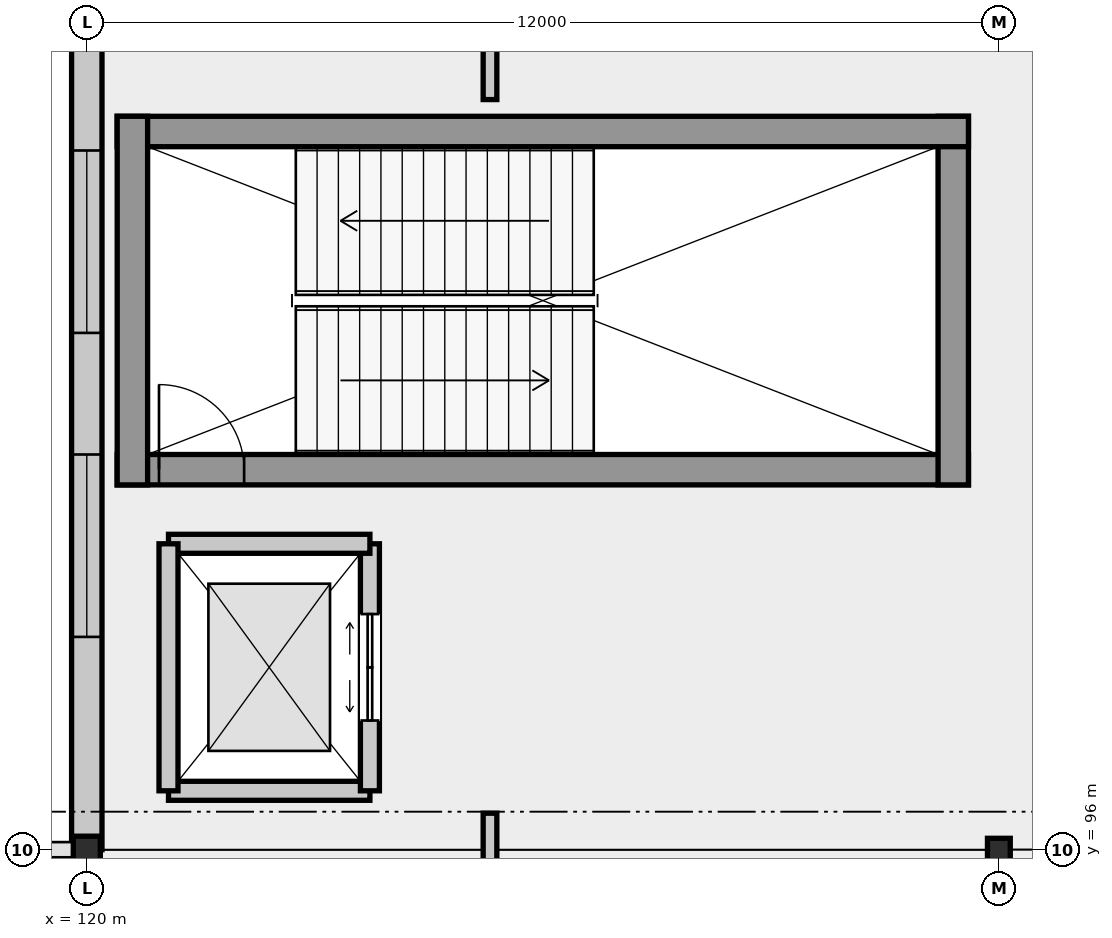
"""IFC4 building model, lengths in metres.
Left out: names, types, materials, properties, quantities, classifications, styles, units other than length and angle.
Written with IfcOpenShell. Run it as: python <this file> out.ifc"""

import sys

from ifc_helpers import new_model, si_unit, direction, frame, frame_2d, origin, origin_2d, place, context, subcontext, project, spatial, rectangle, hollow_circle, i_section, extrude, element, fill, save


model = new_model("IFC4")
c1 = context("Model", 3, precision=1e-05, world=origin(), true_north=direction((0.0, 1.0)))
c2 = subcontext(c1, "Body", "Model", "MODEL_VIEW")
j1 = project(units=[si_unit("LENGTHUNIT", "METRE"), si_unit("PLANEANGLEUNIT", "RADIAN")], contexts=[c1])
p1 = place(None, origin())
s1 = spatial("IfcSite", under=j1, at=p1, CompositionType="ELEMENT")
p2 = place(p1, origin())
s2 = spatial("IfcBuilding", under=s1, at=p2, CompositionType="ELEMENT")
p3 = place(p2, frame((0.0, 0.0, 5.4)))
s3 = spatial("IfcBuildingStorey", under=s2, at=p3, CompositionType="ELEMENT", Elevation=5.4)
p4 = place(p3, frame((120.0, 96.0, 0.0), z_axis=(0.0, 0.0, 1.0), x_axis=(1.0, 0.0, 0.0)))
e1 = element("IfcColumn", 1, at=p4, inside=s3, PredefinedType="COLUMN", context=c2, shape_type="SweptSolid", body=[
    extrude(hollow_circle(Radius=0.178, WallThickness=0.016, at=origin_2d()), origin(), (0.0, 0.0, 1.0), 5.4),
])
p5 = place(p3, frame((132.0, 96.0, 0.0), z_axis=(0.0, 0.0, 1.0), x_axis=(1.0, 0.0, 0.0)))
e2 = element("IfcColumn", 2, at=p5, inside=s3, PredefinedType="COLUMN", context=c2, shape_type="SweptSolid", body=[
    extrude(i_section(OverallWidth=0.3, OverallDepth=0.3, WebThickness=0.011, FlangeThickness=0.019, FilletRadius=0.027, at=origin_2d()), origin(), (0.0, 0.0, 1.0), 5.4),
])
p6 = place(p3, frame((120.0, 108.0, 0.0), z_axis=(0.0, 0.0, 1.0), x_axis=(0.0, -1.0, 0.0)))
e3 = element("IfcWall", 3, at=p6, inside=s3, PredefinedType="SOLIDWALL", context=c2, shape_type="SweptSolid", body=[
    extrude(rectangle(XDim=12.0, YDim=0.4, at=frame_2d((6.0, 0.0))), origin(), (0.0, 0.0, 1.0), 4.53),
])
p7 = place(p6, frame((2.8, 0.0, 0.95)))
e4 = element("IfcOpeningElement", 4, at=p7, cuts=e3, PredefinedType="OPENING", context=c2, shape_type="SweptSolid", body=[
    extrude(rectangle(XDim=2.4, YDim=2.1, at=frame_2d((1.2, 1.05))), frame((0.0, 0.21, 0.0), z_axis=(0.0, -1.0, 0.0), x_axis=(1.0, 0.0, 0.0)), (0.0, 0.0, 1.0), 0.42),
])
p8 = place(p6, frame((6.8, 0.0, 0.95)))
e5 = element("IfcOpeningElement", 5, at=p8, cuts=e3, PredefinedType="OPENING", context=c2, shape_type="SweptSolid", body=[
    extrude(rectangle(XDim=2.4, YDim=2.1, at=frame_2d((1.2, 1.05))), frame((0.0, 0.21, 0.0), z_axis=(0.0, -1.0, 0.0), x_axis=(1.0, 0.0, 0.0)), (0.0, 0.0, 1.0), 0.42),
])
p9 = place(p3, frame((120.4, 101.0, 0.0), z_axis=(0.0, 0.0, 1.0), x_axis=(1.0, 0.0, 0.0)))
e6 = element("IfcWall", 6, at=p9, inside=s3, PredefinedType="SHEAR", context=c2, shape_type="SweptSolid", body=[
    extrude(rectangle(XDim=11.2, YDim=0.4, at=frame_2d((5.6, 0.0))), origin(), (0.0, 0.0, 1.0), 5.11),
])
p10 = place(p9, frame((0.55, 0.0, 0.0)))
e7 = element("IfcOpeningElement", 7, at=p10, cuts=e6, PredefinedType="OPENING", context=c2, shape_type="SweptSolid", body=[
    extrude(rectangle(XDim=1.12, YDim=2.2, at=frame_2d((0.56, 1.1))), frame((0.0, 0.21, 0.0), z_axis=(0.0, -1.0, 0.0), x_axis=(1.0, 0.0, 0.0)), (0.0, 0.0, 1.0), 0.42),
])
p11 = place(p3, frame((131.4, 100.8, 0.0), z_axis=(0.0, 0.0, 1.0), x_axis=(0.0, 1.0, 0.0)))
e8 = element("IfcWall", 8, at=p11, inside=s3, PredefinedType="SHEAR", context=c2, shape_type="SweptSolid", body=[
    extrude(rectangle(XDim=4.85, YDim=0.4, at=frame_2d((2.425, 0.0))), origin(), (0.0, 0.0, 1.0), 5.11),
])
p12 = place(p3, frame((131.6, 105.45, 0.0), z_axis=(0.0, 0.0, 1.0), x_axis=(-1.0, 0.0, 0.0)))
e9 = element("IfcWall", 9, at=p12, inside=s3, PredefinedType="SHEAR", context=c2, shape_type="SweptSolid", body=[
    extrude(rectangle(XDim=11.2, YDim=0.4, at=frame_2d((5.6, 0.0))), origin(), (0.0, 0.0, 1.0), 5.11),
])
p13 = place(p3, frame((120.6, 105.65, 0.0), z_axis=(0.0, 0.0, 1.0), x_axis=(0.0, -1.0, 0.0)))
e10 = element("IfcWall", 10, at=p13, inside=s3, PredefinedType="SHEAR", context=c2, shape_type="SweptSolid", body=[
    extrude(rectangle(XDim=4.85, YDim=0.4, at=frame_2d((2.425, 0.0))), origin(), (0.0, 0.0, 1.0), 5.11),
])
p14 = place(p3, frame((121.075, 96.775, 0.0), z_axis=(0.0, 0.0, 1.0), x_axis=(1.0, 0.0, 0.0)))
e11 = element("IfcWall", 11, at=p14, inside=s3, PredefinedType="SOLIDWALL", context=c2, shape_type="SweptSolid", body=[
    extrude(rectangle(XDim=2.65, YDim=0.25, at=frame_2d((1.325, 0.0))), origin(), (0.0, 0.0, 1.0), 5.11),
])
p15 = place(p3, frame((123.725, 96.775, 0.0), z_axis=(0.0, 0.0, 1.0), x_axis=(0.0, 1.0, 0.0)))
e12 = element("IfcWall", 12, at=p15, inside=s3, PredefinedType="SOLIDWALL", context=c2, shape_type="SweptSolid", body=[
    extrude(rectangle(XDim=3.25, YDim=0.25, at=frame_2d((1.625, 0.0))), origin(), (0.0, 0.0, 1.0), 5.11),
])
p16 = place(p15, frame((0.925, 0.0, 0.0)))
e13 = element("IfcOpeningElement", 13, at=p16, cuts=e12, PredefinedType="OPENING", context=c2, shape_type="SweptSolid", body=[
    extrude(rectangle(XDim=1.4, YDim=2.3, at=frame_2d((0.7, 1.15))), frame((0.0, 0.135, 0.0), z_axis=(0.0, -1.0, 0.0), x_axis=(1.0, 0.0, 0.0)), (0.0, 0.0, 1.0), 0.27),
])
p17 = place(p3, frame((123.725, 100.025, 0.0), z_axis=(0.0, 0.0, 1.0), x_axis=(-1.0, 0.0, 0.0)))
e14 = element("IfcWall", 14, at=p17, inside=s3, PredefinedType="SOLIDWALL", context=c2, shape_type="SweptSolid", body=[
    extrude(rectangle(XDim=2.65, YDim=0.25, at=frame_2d((1.325, 0.0))), origin(), (0.0, 0.0, 1.0), 5.11),
])
p18 = place(p3, frame((121.075, 100.025, 0.0), z_axis=(0.0, 0.0, 1.0), x_axis=(0.0, -1.0, 0.0)))
e15 = element("IfcWall", 15, at=p18, inside=s3, PredefinedType="SOLIDWALL", context=c2, shape_type="SweptSolid", body=[
    extrude(rectangle(XDim=3.25, YDim=0.25, at=frame_2d((1.625, 0.0))), origin(), (0.0, 0.0, 1.0), 5.11),
])
p19 = place(p3, frame((125.305, 93.87, 0.0), z_axis=(0.0, 0.0, 1.0), x_axis=(0.0, 1.0, 0.0)))
e16 = element("IfcWall", 16, at=p19, inside=s3, PredefinedType="PARTITIONING", context=c2, shape_type="SweptSolid", body=[
    extrude(rectangle(XDim=2.61, YDim=0.18, at=frame_2d((1.305, 0.0))), origin(), (0.0, 0.0, 1.0), 4.55),
])
p20 = place(p19, frame((0.65, 0.0, 0.0)))
e17 = element("IfcOpeningElement", 17, at=p20, cuts=e16, PredefinedType="OPENING", context=c2, shape_type="SweptSolid", body=[
    extrude(rectangle(XDim=0.92, YDim=2.15, at=frame_2d((0.46, 1.075))), frame((0.0, 0.1, 0.0), z_axis=(0.0, -1.0, 0.0), x_axis=(1.0, 0.0, 0.0)), (0.0, 0.0, 1.0), 0.2),
])
p21 = place(p3, frame((125.305, 105.87, 0.0), z_axis=(0.0, 0.0, 1.0), x_axis=(0.0, 1.0, 0.0)))
e18 = element("IfcWall", 18, at=p21, inside=s3, PredefinedType="PARTITIONING", context=c2, shape_type="SweptSolid", body=[
    extrude(rectangle(XDim=1.75, YDim=0.18, at=frame_2d((0.875, 0.0))), origin(), (0.0, 0.0, 1.0), 5.09),
])
p22 = place(p7, origin())
e19 = element("IfcWindow", 19, at=p22, inside=s3, PartitioningType="SINGLE_PANEL", PredefinedType="WINDOW", context=c2, shape_type="SweptSolid", body=[
    extrude(rectangle(XDim=2.4, YDim=2.1, at=frame_2d((1.2, 1.05))), frame((0.0, 0.03, 0.0), z_axis=(0.0, -1.0, 0.0), x_axis=(1.0, 0.0, 0.0)), (0.0, 0.0, 1.0), 0.06),
])
fill(e4, e19)
p23 = place(p8, origin())
e20 = element("IfcWindow", 20, at=p23, inside=s3, PartitioningType="SINGLE_PANEL", PredefinedType="WINDOW", context=c2, shape_type="SweptSolid", body=[
    extrude(rectangle(XDim=2.4, YDim=2.1, at=frame_2d((1.2, 1.05))), frame((0.0, 0.03, 0.0), z_axis=(0.0, -1.0, 0.0), x_axis=(1.0, 0.0, 0.0)), (0.0, 0.0, 1.0), 0.06),
])
fill(e5, e20)
p24 = place(p10, origin())
e21 = element("IfcDoor", 21, at=p24, inside=s3, OperationType="SINGLE_SWING_LEFT", PredefinedType="DOOR", context=c2, shape_type="SweptSolid", body=[
    extrude(rectangle(XDim=1.12, YDim=2.2, at=frame_2d((0.56, 1.1))), frame((0.0, 0.025, 0.0), z_axis=(0.0, -1.0, 0.0), x_axis=(1.0, 0.0, 0.0)), (0.0, 0.0, 1.0), 0.05),
])
fill(e7, e21)
p25 = place(p16, origin())
e22 = element("IfcDoor", 22, at=p25, inside=s3, OperationType="SLIDING_TO_LEFT", PredefinedType="DOOR", context=c2, shape_type="SweptSolid", body=[
    extrude(rectangle(XDim=1.4, YDim=2.3, at=frame_2d((0.7, 1.15))), frame((0.0, 0.025, 0.0), z_axis=(0.0, -1.0, 0.0), x_axis=(1.0, 0.0, 0.0)), (0.0, 0.0, 1.0), 0.05),
])
fill(e13, e22)
save(model, sys.argv[1])
